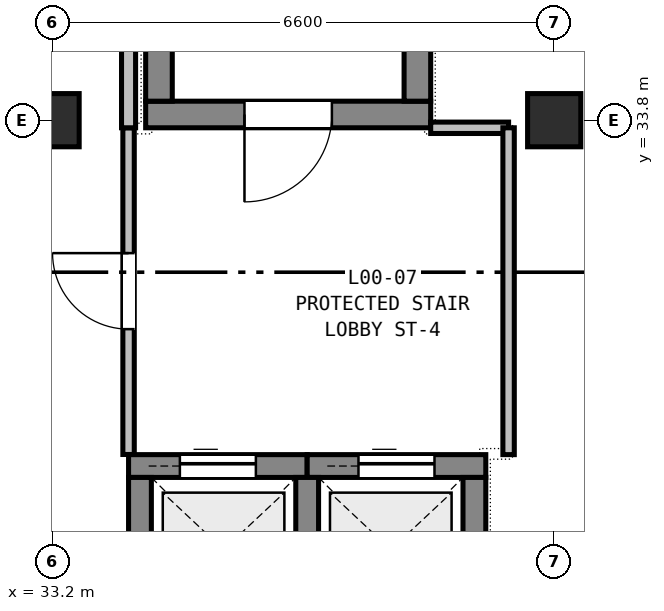
"""IFC4 building model, lengths in metres.
Left out: names, types, materials, properties, quantities, classifications, styles, units other than length and angle.
Written with IfcOpenShell. Run it as: python <this file> out.ifc"""

import sys

from ifc_helpers import new_model, si_unit, direction, frame, frame_2d, origin, origin_2d, place, context, subcontext, project, spatial, rectangle, extrude, element, fill, save


model = new_model("IFC4")
c1 = context("Model", 3, precision=1e-05, world=origin(), true_north=direction((0.0, 1.0)))
c2 = subcontext(c1, "Body", "Model", "MODEL_VIEW")
j1 = project(units=[si_unit("LENGTHUNIT", "METRE"), si_unit("PLANEANGLEUNIT", "RADIAN")], contexts=[c1])
p1 = place(None, origin())
s1 = spatial("IfcSite", under=j1, at=p1, CompositionType="ELEMENT")
p2 = place(p1, origin())
s2 = spatial("IfcBuilding", under=s1, at=p2, CompositionType="ELEMENT")
p3 = place(p2, origin())
s3 = spatial("IfcBuildingStorey", under=s2, at=p3, CompositionType="ELEMENT", Elevation=0.0)
for number, where, z_axis, x_axis in (
    (1, (33.2, 33.8, 0.0), (0.0, 0.0, 1.0), (1.0, 0.0, 0.0)),
    (2, (39.8, 33.8, 0.0), (0.0, 0.0, 1.0), (1.0, 0.0, 0.0)),
):
    element("IfcColumn", number, at=place(p3, frame(where, z_axis=z_axis, x_axis=x_axis)), inside=s3, PredefinedType="COLUMN", context=c2, shape_type="SweptSolid", body=[
        extrude(rectangle(XDim=0.7, YDim=0.7, at=origin_2d()), origin(), (0.0, 0.0, 1.0), 5.4),
    ])
p4 = place(p3, frame((38.175, 33.875, 0.0), z_axis=(0.0, 0.0, 1.0), x_axis=(-1.0, 0.0, 0.0)))
e3 = element("IfcWall", 3, at=p4, inside=s3, PredefinedType="SHEAR", context=c2, shape_type="SweptSolid", body=[
    extrude(rectangle(XDim=3.75, YDim=0.35, at=frame_2d((1.875, 0.0))), origin(), (0.0, 0.0, 1.0), 5.4),
])
p5 = place(p4, frame((1.3, 0.0, 0.0)))
e4 = element("IfcOpeningElement", 4, at=p5, cuts=e3, PredefinedType="OPENING", context=c2, shape_type="SweptSolid", body=[
    extrude(rectangle(XDim=1.15, YDim=2.15, at=frame_2d((0.575, 1.075))), frame((0.0, 0.185, 0.0), z_axis=(0.0, -1.0, 0.0), x_axis=(1.0, 0.0, 0.0)), (0.0, 0.0, 1.0), 0.37),
])
for number, where, z_axis, x_axis in (
    (5, (34.6, 34.05, 0.0), (0.0, 0.0, 1.0), (0.0, 1.0, 0.0)),
    (6, (38.0, 34.05, 0.0), (0.0, 0.0, 1.0), (0.0, 1.0, 0.0)),
):
    element("IfcWall", number, at=place(p3, frame(where, z_axis=z_axis, x_axis=x_axis)), inside=s3, PredefinedType="SHEAR", context=c2, shape_type="SweptSolid", body=[
        extrude(rectangle(XDim=7.275, YDim=0.35, at=frame_2d((3.637, 0.0))), origin(), (0.0, 0.0, 1.0), 5.4),
    ])
p6 = place(p3, frame((34.2, 29.25, 0.0), z_axis=(0.0, 0.0, 1.0), x_axis=(1.0, 0.0, 0.0)))
e7 = element("IfcWall", 7, at=p6, inside=s3, PredefinedType="SHEAR", context=c2, shape_type="SweptSolid", body=[
    extrude(rectangle(XDim=2.35, YDim=0.3, at=frame_2d((1.175, 0.0))), origin(), (0.0, 0.0, 1.0), 5.4),
])
p7 = place(p6, frame((0.675, 0.0, 0.0)))
e8 = element("IfcOpeningElement", 8, at=p7, cuts=e7, PredefinedType="OPENING", context=c2, shape_type="SweptSolid", body=[
    extrude(rectangle(XDim=1.0, YDim=2.1, at=frame_2d((0.5, 1.05))), frame((0.0, 0.16, 0.0), z_axis=(0.0, -1.0, 0.0), x_axis=(1.0, 0.0, 0.0)), (0.0, 0.0, 1.0), 0.32),
])
p8 = place(p3, frame((36.55, 29.25, 0.0), z_axis=(0.0, 0.0, 1.0), x_axis=(1.0, 0.0, 0.0)))
e9 = element("IfcWall", 9, at=p8, inside=s3, PredefinedType="SHEAR", context=c2, shape_type="SweptSolid", body=[
    extrude(rectangle(XDim=2.35, YDim=0.3, at=frame_2d((1.175, 0.0))), origin(), (0.0, 0.0, 1.0), 5.4),
])
p9 = place(p8, frame((0.675, 0.0, 0.0)))
e10 = element("IfcOpeningElement", 10, at=p9, cuts=e9, PredefinedType="OPENING", context=c2, shape_type="SweptSolid", body=[
    extrude(rectangle(XDim=1.0, YDim=2.1, at=frame_2d((0.5, 1.05))), frame((0.0, 0.16, 0.0), z_axis=(0.0, -1.0, 0.0), x_axis=(1.0, 0.0, 0.0)), (0.0, 0.0, 1.0), 0.32),
])
for number, where, z_axis, x_axis in (
    (11, (34.35, 27.2, 0.0), (0.0, 0.0, 1.0), (0.0, 1.0, 0.0)),
    (12, (36.55, 27.2, 0.0), (0.0, 0.0, 1.0), (0.0, 1.0, 0.0)),
    (13, (38.75, 27.2, 0.0), (0.0, 0.0, 1.0), (0.0, 1.0, 0.0)),
):
    element("IfcWall", number, at=place(p3, frame(where, z_axis=z_axis, x_axis=x_axis)), inside=s3, PredefinedType="SHEAR", context=c2, shape_type="SweptSolid", body=[
        extrude(rectangle(XDim=1.9, YDim=0.3, at=frame_2d((0.95, 0.0))), origin(), (0.0, 0.0, 1.0), 5.4),
    ])
p10 = place(p3, frame((38.175, 33.7, 0.0), z_axis=(0.0, 0.0, 1.0), x_axis=(1.0, 0.0, 0.0)))
e14 = element("IfcWall", 14, at=p10, inside=s3, PredefinedType="PARTITIONING", context=c2, shape_type="SweptSolid", body=[
    extrude(rectangle(XDim=1.025, YDim=0.15, at=frame_2d((0.512, 0.0))), origin(), (0.0, 0.0, 1.0), 4.735),
])
p11 = place(p3, frame((39.2, 33.7, 0.0), z_axis=(0.0, 0.0, 1.0), x_axis=(0.0, -1.0, 0.0)))
e15 = element("IfcWall", 15, at=p11, inside=s3, PredefinedType="PARTITIONING", context=c2, shape_type="SweptSolid", body=[
    extrude(rectangle(XDim=4.3, YDim=0.15, at=frame_2d((2.15, 0.0))), origin(), (0.0, 0.0, 1.0), 4.735),
])
p12 = place(p3, frame((34.2, 29.402, 0.0), z_axis=(0.0, 0.0, 1.0), x_axis=(0.0, 1.0, 0.0)))
e16 = element("IfcWall", 16, at=p12, inside=s3, PredefinedType="PARTITIONING", context=c2, shape_type="SweptSolid", body=[
    extrude(rectangle(XDim=4.298, YDim=0.15, at=frame_2d((2.149, 0.0))), origin(), (0.0, 0.0, 1.0), 4.735),
])
p13 = place(p12, frame((1.649, 0.0, 0.0)))
e17 = element("IfcOpeningElement", 17, at=p13, cuts=e16, PredefinedType="OPENING", context=c2, shape_type="SweptSolid", body=[
    extrude(rectangle(XDim=1.0, YDim=2.1, at=frame_2d((0.5, 1.05))), frame((0.0, 0.085, 0.0), z_axis=(0.0, -1.0, 0.0), x_axis=(1.0, 0.0, 0.0)), (0.0, 0.0, 1.0), 0.17),
])
p14 = place(p3, frame((34.2, 33.7, 0.0), z_axis=(0.0, 0.0, 1.0), x_axis=(0.0, 1.0, 0.0)))
e18 = element("IfcWall", 18, at=p14, inside=s3, PredefinedType="PARTITIONING", context=c2, shape_type="SweptSolid", body=[
    extrude(rectangle(XDim=8.158, YDim=0.185, at=frame_2d((4.079, 0.0))), origin(), (0.0, 0.0, 1.0), 4.685),
])
p15 = place(p5, origin())
e19 = element("IfcDoor", 19, at=p15, inside=s3, OperationType="SINGLE_SWING_RIGHT", PredefinedType="DOOR", context=c2, shape_type="SweptSolid", body=[
    extrude(rectangle(XDim=1.15, YDim=2.15, at=frame_2d((0.575, 1.075))), frame((0.0, 0.025, 0.0), z_axis=(0.0, -1.0, 0.0), x_axis=(1.0, 0.0, 0.0)), (0.0, 0.0, 1.0), 0.05),
])
fill(e4, e19)
p16 = place(p7, origin())
e20 = element("IfcDoor", 20, at=p16, inside=s3, OperationType="SLIDING_TO_LEFT", PredefinedType="DOOR", context=c2, shape_type="SweptSolid", body=[
    extrude(rectangle(XDim=1.0, YDim=2.1, at=frame_2d((0.5, 1.05))), frame((0.0, 0.025, 0.0), z_axis=(0.0, -1.0, 0.0), x_axis=(1.0, 0.0, 0.0)), (0.0, 0.0, 1.0), 0.05),
])
fill(e8, e20)
p17 = place(p9, origin())
e21 = element("IfcDoor", 21, at=p17, inside=s3, OperationType="SLIDING_TO_LEFT", PredefinedType="DOOR", context=c2, shape_type="SweptSolid", body=[
    extrude(rectangle(XDim=1.0, YDim=2.1, at=frame_2d((0.5, 1.05))), frame((0.0, 0.025, 0.0), z_axis=(0.0, -1.0, 0.0), x_axis=(1.0, 0.0, 0.0)), (0.0, 0.0, 1.0), 0.05),
])
fill(e10, e21)
p18 = place(p13, origin())
e22 = element("IfcDoor", 22, at=p18, inside=s3, OperationType="SINGLE_SWING_RIGHT", PredefinedType="DOOR", context=c2, shape_type="SweptSolid", body=[
    extrude(rectangle(XDim=1.0, YDim=2.1, at=frame_2d((0.5, 1.05))), frame((0.0, 0.025, 0.0), z_axis=(0.0, -1.0, 0.0), x_axis=(1.0, 0.0, 0.0)), (0.0, 0.0, 1.0), 0.05),
])
fill(e17, e22)
save(model, sys.argv[1])
